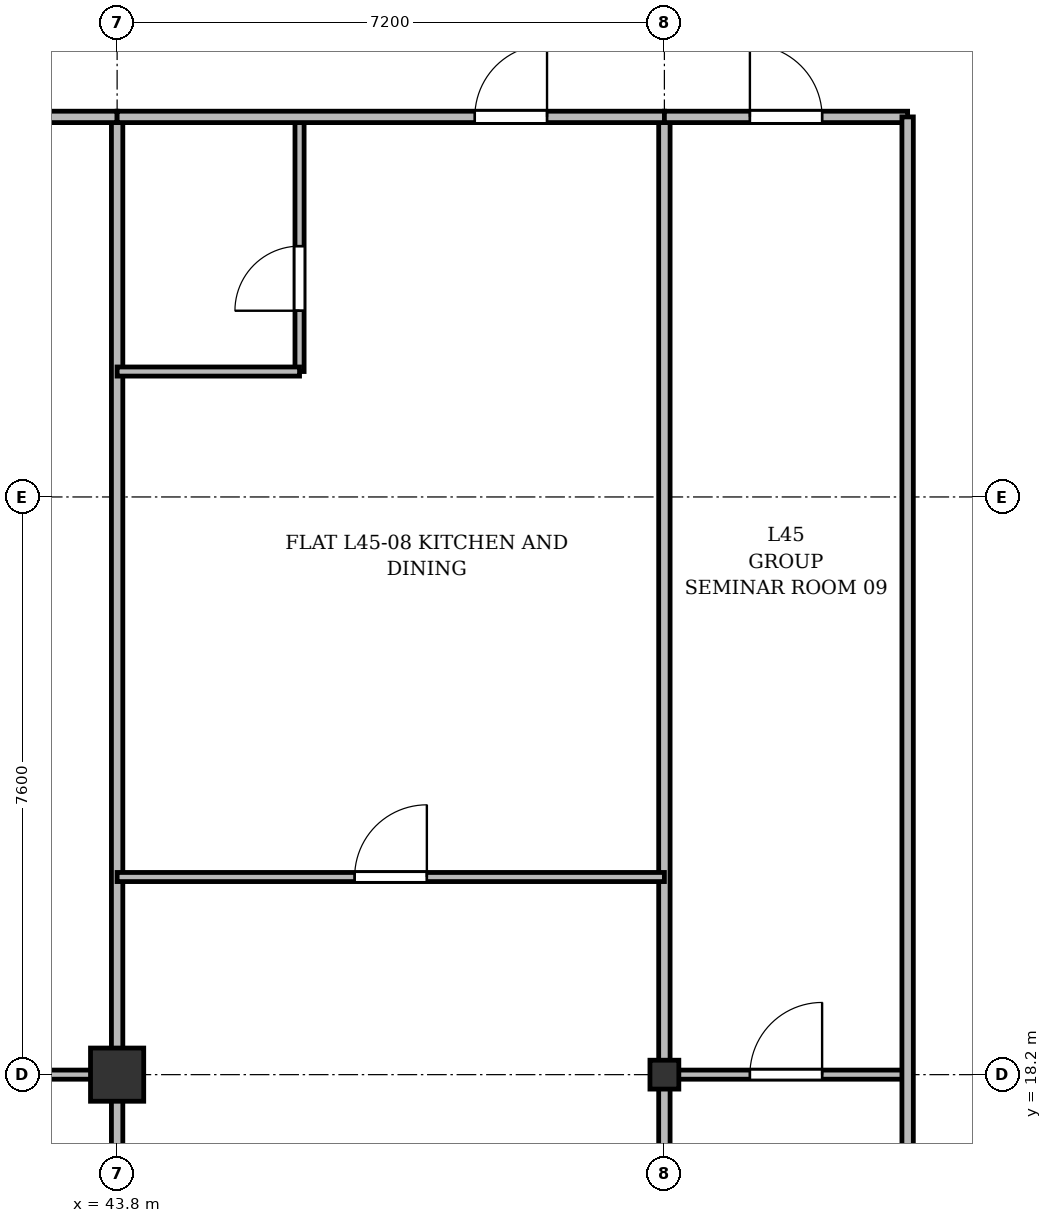
"""IFC4 building model, lengths in metres.
Left out: names, types, materials, properties, quantities, classifications, styles, units other than length and angle.
Written with IfcOpenShell. Run it as: python <this file> out.ifc"""

import sys

from ifc_helpers import new_model, si_unit, direction, frame, frame_2d, origin, origin_2d, place, context, subcontext, project, spatial, rectangle, i_section, extrude, source, transform, mapped, element, fill, save


model = new_model("IFC4")
c1 = context("Model", 3, precision=1e-05, world=origin(), true_north=direction((0.0, 1.0)))
c2 = subcontext(c1, "Body", "Model", "MODEL_VIEW")
j1 = project(units=[si_unit("LENGTHUNIT", "METRE"), si_unit("PLANEANGLEUNIT", "RADIAN")], contexts=[c1])
p1 = place(None, origin())
s1 = spatial("IfcSite", under=j1, at=p1, CompositionType="ELEMENT")
p2 = place(p1, origin())
s2 = spatial("IfcBuilding", under=s1, at=p2, CompositionType="ELEMENT")
p3 = place(p2, frame((0.0, 0.0, 171.7)))
s3 = spatial("IfcBuildingStorey", under=s2, at=p3, CompositionType="ELEMENT", Elevation=171.7)
m1 = source(origin(), c2, "Body", "SweptSolid", [
    extrude(rectangle(XDim=0.7, YDim=0.7, at=origin_2d()), origin(), (0.0, 0.0, 1.0), 3.6),
])
p4 = place(p3, frame((43.8, 18.2, 0.0), z_axis=(0.0, 0.0, 1.0), x_axis=(1.0, 0.0, 0.0)))
e1 = element("IfcColumn", 1, at=p4, inside=s3, PredefinedType="COLUMN", context=c2, shape_type="MappedRepresentation", body=[
    mapped(m1, transform((0.0, 0.0, 0.0), x_axis=(1.0, 0.0, 0.0), y_axis=(0.0, 1.0, 0.0), z_axis=(0.0, 0.0, 1.0), scale=1.0)),
])
m2 = source(origin(), c2, "Body", "SweptSolid", [
    extrude(i_section(OverallWidth=0.38, OverallDepth=0.38, WebThickness=0.02, FlangeThickness=0.03, at=origin_2d()), origin(), (0.0, 0.0, 1.0), 3.6),
])
p5 = place(p3, frame((51.0, 18.2, 0.0), z_axis=(0.0, 0.0, 1.0), x_axis=(1.0, 0.0, 0.0)))
e2 = element("IfcColumn", 2, at=p5, inside=s3, PredefinedType="COLUMN", context=c2, shape_type="MappedRepresentation", body=[
    mapped(m2, transform((0.0, 0.0, 0.0), x_axis=(1.0, 0.0, 0.0), y_axis=(0.0, 1.0, 0.0), z_axis=(0.0, 0.0, 1.0), scale=1.0)),
])
for number, where, z_axis, x_axis in (
    (3, (43.8, 3.525, 0.0), (0.0, 0.0, 1.0), (0.0, 1.0, 0.0)),
    (4, (51.0, 3.525, 0.0), (0.0, 0.0, 1.0), (0.0, 1.0, 0.0)),
):
    element("IfcWall", number, at=place(p3, frame(where, z_axis=z_axis, x_axis=x_axis)), inside=s3, PredefinedType="PARTITIONING", context=c2, shape_type="SweptSolid", body=[
        extrude(rectangle(XDim=27.275, YDim=0.15, at=frame_2d((13.638, 0.0))), origin(), (0.0, 0.0, 1.0), 2.85),
    ])
p6 = place(p3, frame((38.2, 30.8, 0.0), z_axis=(0.0, 0.0, 1.0), x_axis=(1.0, 0.0, 0.0)))
e5 = element("IfcWall", 5, at=p6, inside=s3, PredefinedType="PARTITIONING", context=c2, shape_type="SweptSolid", body=[
    extrude(rectangle(XDim=5.6, YDim=0.15, at=frame_2d((2.8, 0.0))), origin(), (0.0, 0.0, 1.0), 2.85),
])
p7 = place(p6, frame((2.232, 0.0, 0.0)))
e6 = element("IfcOpeningElement", 6, at=p7, cuts=e5, PredefinedType="OPENING", context=c2, shape_type="SweptSolid", body=[
    extrude(rectangle(XDim=0.95, YDim=2.15, at=frame_2d((0.475, 1.075))), frame((0.0, 0.085, 0.0), z_axis=(0.0, -1.0, 0.0), x_axis=(1.0, 0.0, 0.0)), (0.0, 0.0, 1.0), 0.17),
])
p8 = place(p3, frame((38.2, 18.2, 0.0), z_axis=(0.0, 0.0, 1.0), x_axis=(1.0, 0.0, 0.0)))
e7 = element("IfcWall", 7, at=p8, inside=s3, PredefinedType="PARTITIONING", context=c2, shape_type="SweptSolid", body=[
    extrude(rectangle(XDim=5.6, YDim=0.12, at=frame_2d((2.8, 0.0))), origin(), (0.0, 0.0, 1.0), 2.75),
])
p9 = place(p8, frame((2.232, 0.0, 0.0)))
e8 = element("IfcOpeningElement", 8, at=p9, cuts=e7, PredefinedType="OPENING", context=c2, shape_type="SweptSolid", body=[
    extrude(rectangle(XDim=0.95, YDim=2.15, at=frame_2d((0.475, 1.075))), frame((0.0, 0.07, 0.0), z_axis=(0.0, -1.0, 0.0), x_axis=(1.0, 0.0, 0.0)), (0.0, 0.0, 1.0), 0.14),
])
p10 = place(p3, frame((43.8, 20.8, 0.0), z_axis=(0.0, 0.0, 1.0), x_axis=(1.0, 0.0, 0.0)))
e9 = element("IfcWall", 9, at=p10, inside=s3, PredefinedType="PARTITIONING", context=c2, shape_type="SweptSolid", body=[
    extrude(rectangle(XDim=7.2, YDim=0.12, at=frame_2d((3.6, 0.0))), origin(), (0.0, 0.0, 1.0), 2.85),
])
p11 = place(p10, frame((3.125, 0.0, 0.0)))
e10 = element("IfcOpeningElement", 10, at=p11, cuts=e9, PredefinedType="OPENING", context=c2, shape_type="SweptSolid", body=[
    extrude(rectangle(XDim=0.95, YDim=2.15, at=frame_2d((0.475, 1.075))), frame((0.0, 0.07, 0.0), z_axis=(0.0, -1.0, 0.0), x_axis=(1.0, 0.0, 0.0)), (0.0, 0.0, 1.0), 0.14),
])
p12 = place(p3, frame((46.2, 27.45, 0.0), z_axis=(0.0, 0.0, 1.0), x_axis=(0.0, 1.0, 0.0)))
e11 = element("IfcWall", 11, at=p12, inside=s3, PredefinedType="PARTITIONING", context=c2, shape_type="SweptSolid", body=[
    extrude(rectangle(XDim=3.35, YDim=0.12, at=frame_2d((1.675, 0.0))), origin(), (0.0, 0.0, 1.0), 3.35),
])
p13 = place(p12, frame((0.8, 0.0, 0.0)))
e12 = element("IfcOpeningElement", 12, at=p13, cuts=e11, PredefinedType="OPENING", context=c2, shape_type="SweptSolid", body=[
    extrude(rectangle(XDim=0.85, YDim=2.1, at=frame_2d((0.425, 1.05))), frame((0.0, 0.07, 0.0), z_axis=(0.0, -1.0, 0.0), x_axis=(1.0, 0.0, 0.0)), (0.0, 0.0, 1.0), 0.14),
])
p14 = place(p3, frame((43.8, 27.45, 0.0), z_axis=(0.0, 0.0, 1.0), x_axis=(1.0, 0.0, 0.0)))
e13 = element("IfcWall", 13, at=p14, inside=s3, PredefinedType="PARTITIONING", context=c2, shape_type="SweptSolid", body=[
    extrude(rectangle(XDim=2.4, YDim=0.12, at=frame_2d((1.2, 0.0))), origin(), (0.0, 0.0, 1.0), 2.85),
])
p15 = place(p3, frame((43.8, 30.8, 0.0), z_axis=(0.0, 0.0, 1.0), x_axis=(1.0, 0.0, 0.0)))
e14 = element("IfcWall", 14, at=p15, inside=s3, PredefinedType="PARTITIONING", context=c2, shape_type="SweptSolid", body=[
    extrude(rectangle(XDim=7.2, YDim=0.15, at=frame_2d((3.6, 0.0))), origin(), (0.0, 0.0, 1.0), 2.85),
])
p16 = place(p15, frame((4.706, 0.0, 0.0)))
e15 = element("IfcOpeningElement", 15, at=p16, cuts=e14, PredefinedType="OPENING", context=c2, shape_type="SweptSolid", body=[
    extrude(rectangle(XDim=0.95, YDim=2.15, at=frame_2d((0.475, 1.075))), frame((0.0, 0.085, 0.0), z_axis=(0.0, -1.0, 0.0), x_axis=(1.0, 0.0, 0.0)), (0.0, 0.0, 1.0), 0.17),
])
p17 = place(p3, frame((51.0, 30.8, 0.0), z_axis=(0.0, 0.0, 1.0), x_axis=(1.0, 0.0, 0.0)))
e16 = element("IfcWall", 16, at=p17, inside=s3, PredefinedType="PARTITIONING", context=c2, shape_type="SweptSolid", body=[
    extrude(rectangle(XDim=3.2, YDim=0.15, at=frame_2d((1.6, 0.0))), origin(), (0.0, 0.0, 1.0), 2.85),
])
p18 = place(p17, frame((1.125, 0.0, 0.0)))
e17 = element("IfcOpeningElement", 17, at=p18, cuts=e16, PredefinedType="OPENING", context=c2, shape_type="SweptSolid", body=[
    extrude(rectangle(XDim=0.95, YDim=2.15, at=frame_2d((0.475, 1.075))), frame((0.0, 0.085, 0.0), z_axis=(0.0, -1.0, 0.0), x_axis=(1.0, 0.0, 0.0)), (0.0, 0.0, 1.0), 0.17),
])
p19 = place(p3, frame((51.0, 18.2, 0.0), z_axis=(0.0, 0.0, 1.0), x_axis=(1.0, 0.0, 0.0)))
e18 = element("IfcWall", 18, at=p19, inside=s3, PredefinedType="PARTITIONING", context=c2, shape_type="SweptSolid", body=[
    extrude(rectangle(XDim=3.2, YDim=0.12, at=frame_2d((1.6, 0.0))), origin(), (0.0, 0.0, 1.0), 2.75),
])
p20 = place(p19, frame((1.125, 0.0, 0.0)))
e19 = element("IfcOpeningElement", 19, at=p20, cuts=e18, PredefinedType="OPENING", context=c2, shape_type="SweptSolid", body=[
    extrude(rectangle(XDim=0.95, YDim=2.15, at=frame_2d((0.475, 1.075))), frame((0.0, 0.07, 0.0), z_axis=(0.0, -1.0, 0.0), x_axis=(1.0, 0.0, 0.0)), (0.0, 0.0, 1.0), 0.14),
])
p21 = place(p3, frame((54.2, 3.525, 0.0), z_axis=(0.0, 0.0, 1.0), x_axis=(0.0, 1.0, 0.0)))
e20 = element("IfcWall", 20, at=p21, inside=s3, PredefinedType="PARTITIONING", context=c2, shape_type="SweptSolid", body=[
    extrude(rectangle(XDim=27.275, YDim=0.15, at=frame_2d((13.638, 0.0))), origin(), (0.0, 0.0, 1.0), 2.75),
])
m3 = source(origin(), c2, "Body", "SweptSolid", [
    extrude(rectangle(XDim=0.95, YDim=2.15, at=frame_2d((0.475, 1.075))), frame((0.0, 0.025, 0.0), z_axis=(0.0, -1.0, 0.0), x_axis=(1.0, 0.0, 0.0)), (0.0, 0.0, 1.0), 0.05),
])
p22 = place(p11, origin())
e21 = element("IfcDoor", 21, at=p22, inside=s3, OperationType="SINGLE_SWING_RIGHT", PredefinedType="DOOR", context=c2, shape_type="MappedRepresentation", body=[
    mapped(m3, transform((0.0, 0.0, 0.0), x_axis=(1.0, 0.0, 0.0), y_axis=(0.0, 1.0, 0.0), z_axis=(0.0, 0.0, 1.0), scale=1.0)),
])
fill(e10, e21)
m4 = source(origin(), c2, "Body", "SweptSolid", [
    extrude(rectangle(XDim=0.85, YDim=2.1, at=frame_2d((0.425, 1.05))), frame((0.0, 0.025, 0.0), z_axis=(0.0, -1.0, 0.0), x_axis=(1.0, 0.0, 0.0)), (0.0, 0.0, 1.0), 0.05),
])
p23 = place(p13, origin())
e22 = element("IfcDoor", 22, at=p23, inside=s3, OperationType="SINGLE_SWING_LEFT", PredefinedType="DOOR", context=c2, shape_type="MappedRepresentation", body=[
    mapped(m4, transform((0.0, 0.0, 0.0), x_axis=(1.0, 0.0, 0.0), y_axis=(0.0, 1.0, 0.0), z_axis=(0.0, 0.0, 1.0), scale=1.0)),
])
fill(e12, e22)
p24 = place(p16, origin())
e23 = element("IfcDoor", 23, at=p24, inside=s3, OperationType="SINGLE_SWING_RIGHT", PredefinedType="DOOR", context=c2, shape_type="MappedRepresentation", body=[
    mapped(m3, transform((0.0, 0.0, 0.0), x_axis=(1.0, 0.0, 0.0), y_axis=(0.0, 1.0, 0.0), z_axis=(0.0, 0.0, 1.0), scale=1.0)),
])
fill(e15, e23)
p25 = place(p18, origin())
e24 = element("IfcDoor", 24, at=p25, inside=s3, OperationType="SINGLE_SWING_LEFT", PredefinedType="DOOR", context=c2, shape_type="MappedRepresentation", body=[
    mapped(m3, transform((0.0, 0.0, 0.0), x_axis=(1.0, 0.0, 0.0), y_axis=(0.0, 1.0, 0.0), z_axis=(0.0, 0.0, 1.0), scale=1.0)),
])
fill(e17, e24)
p26 = place(p20, origin())
e25 = element("IfcDoor", 25, at=p26, inside=s3, OperationType="SINGLE_SWING_RIGHT", PredefinedType="DOOR", context=c2, shape_type="MappedRepresentation", body=[
    mapped(m3, transform((0.0, 0.0, 0.0), x_axis=(1.0, 0.0, 0.0), y_axis=(0.0, 1.0, 0.0), z_axis=(0.0, 0.0, 1.0), scale=1.0)),
])
fill(e19, e25)
save(model, sys.argv[1])
